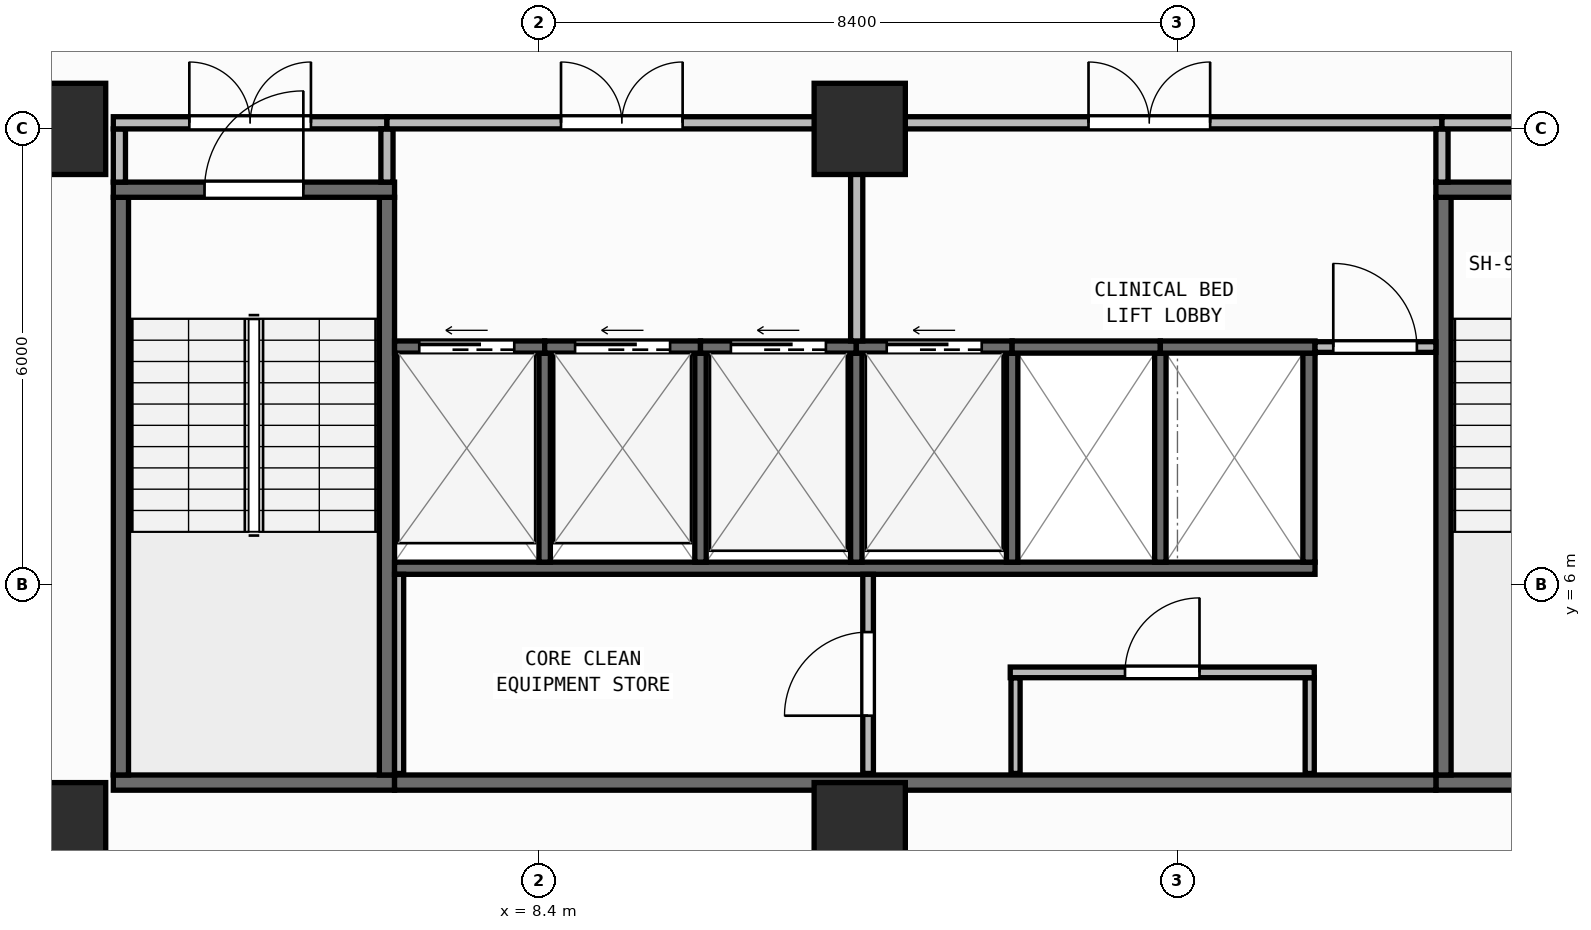
"""IFC4 building model, lengths in metres.
Left out: names, types, materials, properties, quantities, classifications, styles, units other than length and angle.
Written with IfcOpenShell. Run it as: python <this file> out.ifc"""

import sys

from ifc_helpers import new_model, si_unit, direction, frame, frame_2d, origin, origin_2d, place, context, subcontext, project, spatial, rectangle, extrude, element, fill, save


model = new_model("IFC4")
c1 = context("Model", 3, precision=1e-05, world=origin(), true_north=direction((0.0, 1.0)))
c2 = subcontext(c1, "Body", "Model", "MODEL_VIEW")
j1 = project(units=[si_unit("LENGTHUNIT", "METRE"), si_unit("PLANEANGLEUNIT", "RADIAN")], contexts=[c1])
p1 = place(None, origin())
s1 = spatial("IfcSite", under=j1, at=p1, CompositionType="ELEMENT")
p2 = place(p1, origin())
s2 = spatial("IfcBuilding", under=s1, at=p2, CompositionType="ELEMENT")
p3 = place(p2, frame((0.0, 0.0, 107.3)))
s3 = spatial("IfcBuildingStorey", under=s2, at=p3, CompositionType="ELEMENT", Elevation=107.3)
for number, where, z_axis, x_axis in (
    (1, (2.1, 2.8, 0.0), (0.0, 0.0, 1.0), (1.0, 0.0, 0.0)),
    (2, (12.62, 2.8, 0.0), (0.0, 0.0, 1.0), (1.0, 0.0, 0.0)),
    (3, (2.1, 12.0, 0.0), (0.0, 0.0, 1.0), (1.0, 0.0, 0.0)),
    (4, (12.62, 12.0, 0.0), (0.0, 0.0, 1.0), (1.0, 0.0, 0.0)),
):
    element("IfcColumn", number, at=place(p3, frame(where, z_axis=z_axis, x_axis=x_axis)), inside=s3, PredefinedType="COLUMN", context=c2, shape_type="SweptSolid", body=[
        extrude(rectangle(XDim=1.2, YDim=1.2, at=origin_2d()), origin(), (0.0, 0.0, 1.0), 3.95),
    ])
p4 = place(p3, frame((2.76, 0.173, 0.0), z_axis=(0.0, 0.0, 1.0), x_axis=(0.996857931723, 0.079210251617, 0.0)))
e5 = element("IfcWall", 5, at=p4, inside=s3, PredefinedType="STANDARD", context=c2, shape_type="SweptSolid", body=[
    extrude(rectangle(XDim=51.442, YDim=0.26, at=frame_2d((25.721, 0.0))), origin(), (0.0, 0.0, 1.0), 3.71),
])
p5 = place(p4, frame((24.521, 0.0, 0.9)))
e6 = element("IfcOpeningElement", 6, at=p5, cuts=e5, PredefinedType="OPENING", context=c2, shape_type="SweptSolid", body=[
    extrude(rectangle(XDim=2.4, YDim=1.65, at=frame_2d((1.2, 0.825))), frame((0.0, 0.14, 0.0), z_axis=(0.0, -1.0, 0.0), x_axis=(1.0, 0.0, 0.0)), (0.0, 0.0, 1.0), 0.28),
])
p6 = place(p3, frame((2.8, 3.4, 0.0), z_axis=(0.0, 0.0, 1.0), x_axis=(1.0, 0.0, 0.0)))
e7 = element("IfcWall", 7, at=p6, inside=s3, PredefinedType="SHEAR", context=c2, shape_type="SweptSolid", body=[
    extrude(rectangle(XDim=3.7, YDim=0.2, at=frame_2d((1.85, 0.0))), origin(), (0.0, 0.0, 1.0), 3.71),
])
for number, where, z_axis, x_axis in (
    (8, (2.9, 3.5, 0.0), (0.0, 0.0, 1.0), (0.0, 1.0, 0.0)),
    (9, (6.4, 3.5, 0.0), (0.0, 0.0, 1.0), (0.0, 1.0, 0.0)),
):
    element("IfcWall", number, at=place(p3, frame(where, z_axis=z_axis, x_axis=x_axis)), inside=s3, PredefinedType="SHEAR", context=c2, shape_type="SweptSolid", body=[
        extrude(rectangle(XDim=7.6, YDim=0.2, at=frame_2d((3.8, 0.0))), origin(), (0.0, 0.0, 1.0), 3.71),
    ])
p7 = place(p3, frame((2.8, 11.2, 0.0), z_axis=(0.0, 0.0, 1.0), x_axis=(1.0, 0.0, 0.0)))
e10 = element("IfcWall", 10, at=p7, inside=s3, PredefinedType="SHEAR", context=c2, shape_type="SweptSolid", body=[
    extrude(rectangle(XDim=3.7, YDim=0.2, at=frame_2d((1.85, 0.0))), origin(), (0.0, 0.0, 1.0), 3.71),
])
p8 = place(p7, frame((1.2, 0.0, 0.0)))
e11 = element("IfcOpeningElement", 11, at=p8, cuts=e10, PredefinedType="OPENING", context=c2, shape_type="SweptSolid", body=[
    extrude(rectangle(XDim=1.3, YDim=2.15, at=frame_2d((0.65, 1.075))), frame((0.0, 0.11, 0.0), z_axis=(0.0, -1.0, 0.0), x_axis=(1.0, 0.0, 0.0)), (0.0, 0.0, 1.0), 0.22),
])
p9 = place(p3, frame((20.2, 3.4, 0.0), z_axis=(0.0, 0.0, 1.0), x_axis=(1.0, 0.0, 0.0)))
e12 = element("IfcWall", 12, at=p9, inside=s3, PredefinedType="SHEAR", context=c2, shape_type="SweptSolid", body=[
    extrude(rectangle(XDim=3.7, YDim=0.2, at=frame_2d((1.85, 0.0))), origin(), (0.0, 0.0, 1.0), 3.71),
])
p10 = place(p3, frame((20.3, 3.5, 0.0), z_axis=(0.0, 0.0, 1.0), x_axis=(0.0, 1.0, 0.0)))
e13 = element("IfcWall", 13, at=p10, inside=s3, PredefinedType="SHEAR", context=c2, shape_type="SweptSolid", body=[
    extrude(rectangle(XDim=7.6, YDim=0.2, at=frame_2d((3.8, 0.0))), origin(), (0.0, 0.0, 1.0), 3.71),
])
p11 = place(p3, frame((20.2, 11.2, 0.0), z_axis=(0.0, 0.0, 1.0), x_axis=(1.0, 0.0, 0.0)))
e14 = element("IfcWall", 14, at=p11, inside=s3, PredefinedType="SHEAR", context=c2, shape_type="SweptSolid", body=[
    extrude(rectangle(XDim=3.7, YDim=0.2, at=frame_2d((1.85, 0.0))), origin(), (0.0, 0.0, 1.0), 3.71),
])
p12 = place(p11, frame((1.2, 0.0, 0.0)))
e15 = element("IfcOpeningElement", 15, at=p12, cuts=e14, PredefinedType="OPENING", context=c2, shape_type="SweptSolid", body=[
    extrude(rectangle(XDim=1.3, YDim=2.15, at=frame_2d((0.65, 1.075))), frame((0.0, 0.11, 0.0), z_axis=(0.0, -1.0, 0.0), x_axis=(1.0, 0.0, 0.0)), (0.0, 0.0, 1.0), 0.22),
])
p13 = place(p3, frame((6.5, 3.4, 0.0), z_axis=(0.0, 0.0, 1.0), x_axis=(1.0, 0.0, 0.0)))
e16 = element("IfcWall", 16, at=p13, inside=s3, PredefinedType="SHEAR", context=c2, shape_type="SweptSolid", body=[
    extrude(rectangle(XDim=13.7, YDim=0.2, at=frame_2d((6.85, 0.0))), origin(), (0.0, 0.0, 1.0), 3.71),
])
p14 = place(p3, frame((6.5, 6.22, 0.0), z_axis=(0.0, 0.0, 1.0), x_axis=(1.0, 0.0, 0.0)))
e17 = element("IfcWall", 17, at=p14, inside=s3, PredefinedType="SHEAR", context=c2, shape_type="SweptSolid", body=[
    extrude(rectangle(XDim=12.11, YDim=0.16, at=frame_2d((6.055, 0.0))), origin(), (0.0, 0.0, 1.0), 3.71),
])
p15 = place(p3, frame((18.53, 6.3, 0.0), z_axis=(0.0, 0.0, 1.0), x_axis=(0.0, 1.0, 0.0)))
e18 = element("IfcWall", 18, at=p15, inside=s3, PredefinedType="SHEAR", context=c2, shape_type="SweptSolid", body=[
    extrude(rectangle(XDim=2.75, YDim=0.16, at=frame_2d((1.375, 0.0))), origin(), (0.0, 0.0, 1.0), 3.71),
])
for number, where, z_axis, x_axis in (
    (19, (8.475, 6.3, 0.0), (0.0, 0.0, 1.0), (0.0, 1.0, 0.0)),
    (20, (10.525, 6.3, 0.0), (0.0, 0.0, 1.0), (0.0, 1.0, 0.0)),
    (21, (12.575, 6.3, 0.0), (0.0, 0.0, 1.0), (0.0, 1.0, 0.0)),
    (22, (14.625, 6.3, 0.0), (0.0, 0.0, 1.0), (0.0, 1.0, 0.0)),
    (23, (16.575, 6.3, 0.0), (0.0, 0.0, 1.0), (0.0, 1.0, 0.0)),
):
    element("IfcWall", number, at=place(p3, frame(where, z_axis=z_axis, x_axis=x_axis)), inside=s3, PredefinedType="SHEAR", context=c2, shape_type="SweptSolid", body=[
        extrude(rectangle(XDim=2.75, YDim=0.15, at=frame_2d((1.375, 0.0))), origin(), (0.0, 0.0, 1.0), 3.71),
    ])
p16 = place(p3, frame((6.5, 9.13, 0.0), z_axis=(0.0, 0.0, 1.0), x_axis=(1.0, 0.0, 0.0)))
e24 = element("IfcWall", 24, at=p16, inside=s3, PredefinedType="SHEAR", context=c2, shape_type="SweptSolid", body=[
    extrude(rectangle(XDim=1.975, YDim=0.16, at=frame_2d((0.988, 0.0))), origin(), (0.0, 0.0, 1.0), 3.71),
])
p17 = place(p16, frame((0.325, 0.0, 0.0)))
e25 = element("IfcOpeningElement", 25, at=p17, cuts=e24, PredefinedType="OPENING", context=c2, shape_type="SweptSolid", body=[
    extrude(rectangle(XDim=1.25, YDim=2.15, at=frame_2d((0.625, 1.075))), frame((0.0, 0.09, 0.0), z_axis=(0.0, -1.0, 0.0), x_axis=(1.0, 0.0, 0.0)), (0.0, 0.0, 1.0), 0.18),
])
p18 = place(p3, frame((8.475, 9.13, 0.0), z_axis=(0.0, 0.0, 1.0), x_axis=(1.0, 0.0, 0.0)))
e26 = element("IfcWall", 26, at=p18, inside=s3, PredefinedType="SHEAR", context=c2, shape_type="SweptSolid", body=[
    extrude(rectangle(XDim=2.05, YDim=0.16, at=frame_2d((1.025, 0.0))), origin(), (0.0, 0.0, 1.0), 3.71),
])
p19 = place(p18, frame((0.4, 0.0, 0.0)))
e27 = element("IfcOpeningElement", 27, at=p19, cuts=e26, PredefinedType="OPENING", context=c2, shape_type="SweptSolid", body=[
    extrude(rectangle(XDim=1.25, YDim=2.15, at=frame_2d((0.625, 1.075))), frame((0.0, 0.09, 0.0), z_axis=(0.0, -1.0, 0.0), x_axis=(1.0, 0.0, 0.0)), (0.0, 0.0, 1.0), 0.18),
])
p20 = place(p3, frame((10.525, 9.13, 0.0), z_axis=(0.0, 0.0, 1.0), x_axis=(1.0, 0.0, 0.0)))
e28 = element("IfcWall", 28, at=p20, inside=s3, PredefinedType="SHEAR", context=c2, shape_type="SweptSolid", body=[
    extrude(rectangle(XDim=2.05, YDim=0.16, at=frame_2d((1.025, 0.0))), origin(), (0.0, 0.0, 1.0), 3.71),
])
p21 = place(p20, frame((0.4, 0.0, 0.0)))
e29 = element("IfcOpeningElement", 29, at=p21, cuts=e28, PredefinedType="OPENING", context=c2, shape_type="SweptSolid", body=[
    extrude(rectangle(XDim=1.25, YDim=2.15, at=frame_2d((0.625, 1.075))), frame((0.0, 0.09, 0.0), z_axis=(0.0, -1.0, 0.0), x_axis=(1.0, 0.0, 0.0)), (0.0, 0.0, 1.0), 0.18),
])
p22 = place(p3, frame((12.575, 9.13, 0.0), z_axis=(0.0, 0.0, 1.0), x_axis=(1.0, 0.0, 0.0)))
e30 = element("IfcWall", 30, at=p22, inside=s3, PredefinedType="SHEAR", context=c2, shape_type="SweptSolid", body=[
    extrude(rectangle(XDim=2.05, YDim=0.16, at=frame_2d((1.025, 0.0))), origin(), (0.0, 0.0, 1.0), 3.71),
])
p23 = place(p22, frame((0.4, 0.0, 0.0)))
e31 = element("IfcOpeningElement", 31, at=p23, cuts=e30, PredefinedType="OPENING", context=c2, shape_type="SweptSolid", body=[
    extrude(rectangle(XDim=1.25, YDim=2.15, at=frame_2d((0.625, 1.075))), frame((0.0, 0.09, 0.0), z_axis=(0.0, -1.0, 0.0), x_axis=(1.0, 0.0, 0.0)), (0.0, 0.0, 1.0), 0.18),
])
p24 = place(p3, frame((14.625, 9.13, 0.0), z_axis=(0.0, 0.0, 1.0), x_axis=(1.0, 0.0, 0.0)))
e32 = element("IfcWall", 32, at=p24, inside=s3, PredefinedType="SHEAR", context=c2, shape_type="SweptSolid", body=[
    extrude(rectangle(XDim=1.95, YDim=0.16, at=frame_2d((0.975, 0.0))), origin(), (0.0, 0.0, 1.0), 3.71),
])
p25 = place(p3, frame((16.575, 9.13, 0.0), z_axis=(0.0, 0.0, 1.0), x_axis=(1.0, 0.0, 0.0)))
e33 = element("IfcWall", 33, at=p25, inside=s3, PredefinedType="SHEAR", context=c2, shape_type="SweptSolid", body=[
    extrude(rectangle(XDim=2.035, YDim=0.16, at=frame_2d((1.018, 0.0))), origin(), (0.0, 0.0, 1.0), 3.71),
])
p26 = place(p3, frame((6.56, 3.52, 0.0), z_axis=(0.0, 0.0, 1.0), x_axis=(0.0, 1.0, 0.0)))
e34 = element("IfcWall", 34, at=p26, inside=s3, PredefinedType="PARTITIONING", context=c2, shape_type="SweptSolid", body=[
    extrude(rectangle(XDim=2.62, YDim=0.12, at=frame_2d((1.31, 0.0))), origin(), (0.0, 0.0, 1.0), 3.71),
])
p27 = place(p3, frame((12.73, 3.52, 0.0), z_axis=(0.0, 0.0, 1.0), x_axis=(0.0, 1.0, 0.0)))
e35 = element("IfcWall", 35, at=p27, inside=s3, PredefinedType="PARTITIONING", context=c2, shape_type="SweptSolid", body=[
    extrude(rectangle(XDim=2.62, YDim=0.14, at=frame_2d((1.31, 0.0))), origin(), (0.0, 0.0, 1.0), 3.71),
])
p28 = place(p27, frame((0.76, 0.0, 0.0)))
e36 = element("IfcOpeningElement", 36, at=p28, cuts=e35, PredefinedType="OPENING", context=c2, shape_type="SweptSolid", body=[
    extrude(rectangle(XDim=1.1, YDim=2.1, at=frame_2d((0.55, 1.05))), frame((0.0, 0.08, 0.0), z_axis=(0.0, -1.0, 0.0), x_axis=(1.0, 0.0, 0.0)), (0.0, 0.0, 1.0), 0.16),
])
for number, where, z_axis, x_axis in (
    (37, (14.67, 3.52, 0.0), (0.0, 0.0, 1.0), (0.0, 1.0, 0.0)),
    (38, (18.54, 3.52, 0.0), (0.0, 0.0, 1.0), (0.0, 1.0, 0.0)),
):
    element("IfcWall", number, at=place(p3, frame(where, z_axis=z_axis, x_axis=x_axis)), inside=s3, PredefinedType="PARTITIONING", context=c2, shape_type="SweptSolid", body=[
        extrude(rectangle(XDim=1.26, YDim=0.12, at=frame_2d((0.63, 0.0))), origin(), (0.0, 0.0, 1.0), 3.71),
    ])
p29 = place(p3, frame((14.6, 4.85, 0.0), z_axis=(0.0, 0.0, 1.0), x_axis=(1.0, 0.0, 0.0)))
e39 = element("IfcWall", 39, at=p29, inside=s3, PredefinedType="PARTITIONING", context=c2, shape_type="SweptSolid", body=[
    extrude(rectangle(XDim=4.0, YDim=0.14, at=frame_2d((2.0, 0.0))), origin(), (0.0, 0.0, 1.0), 3.71),
])
p30 = place(p29, frame((1.51, 0.0, 0.0)))
e40 = element("IfcOpeningElement", 40, at=p30, cuts=e39, PredefinedType="OPENING", context=c2, shape_type="SweptSolid", body=[
    extrude(rectangle(XDim=0.98, YDim=2.1, at=frame_2d((0.49, 1.05))), frame((0.0, 0.08, 0.0), z_axis=(0.0, -1.0, 0.0), x_axis=(1.0, 0.0, 0.0)), (0.0, 0.0, 1.0), 0.16),
])
p31 = place(p3, frame((18.61, 9.13, 0.0), z_axis=(0.0, 0.0, 1.0), x_axis=(1.0, 0.0, 0.0)))
e41 = element("IfcWall", 41, at=p31, inside=s3, PredefinedType="PARTITIONING", context=c2, shape_type="SweptSolid", body=[
    extrude(rectangle(XDim=1.59, YDim=0.14, at=frame_2d((0.795, 0.0))), origin(), (0.0, 0.0, 1.0), 3.71),
])
p32 = place(p31, frame((0.24, 0.0, 0.0)))
e42 = element("IfcOpeningElement", 42, at=p32, cuts=e41, PredefinedType="OPENING", context=c2, shape_type="SweptSolid", body=[
    extrude(rectangle(XDim=1.1, YDim=2.1, at=frame_2d((0.55, 1.05))), frame((0.0, 0.08, 0.0), z_axis=(0.0, -1.0, 0.0), x_axis=(1.0, 0.0, 0.0)), (0.0, 0.0, 1.0), 0.16),
])
p33 = place(p3, frame((2.88, 11.3, 0.0), z_axis=(0.0, 0.0, 1.0), x_axis=(0.0, 1.0, 0.0)))
e43 = element("IfcWall", 43, at=p33, inside=s3, PredefinedType="PARTITIONING", context=c2, shape_type="SweptSolid", body=[
    extrude(rectangle(XDim=0.7, YDim=0.16, at=frame_2d((0.35, 0.0))), origin(), (0.0, 0.0, 1.0), 3.71),
])
p34 = place(p3, frame((2.8, 12.08, 0.0), z_axis=(0.0, 0.0, 1.0), x_axis=(1.0, 0.0, 0.0)))
e44 = element("IfcWall", 44, at=p34, inside=s3, PredefinedType="PARTITIONING", context=c2, shape_type="SweptSolid", body=[
    extrude(rectangle(XDim=3.6, YDim=0.16, at=frame_2d((1.8, 0.0))), origin(), (0.0, 0.0, 1.0), 3.083),
])
p35 = place(p34, frame((1.0, 0.0, 0.0)))
e45 = element("IfcOpeningElement", 45, at=p35, cuts=e44, PredefinedType="OPENING", context=c2, shape_type="SweptSolid", body=[
    extrude(rectangle(XDim=1.6, YDim=2.05, at=frame_2d((0.8, 1.025))), frame((0.0, 0.09, 0.0), z_axis=(0.0, -1.0, 0.0), x_axis=(1.0, 0.0, 0.0)), (0.0, 0.0, 1.0), 0.18),
])
p36 = place(p3, frame((6.4, 11.3, 0.0), z_axis=(0.0, 0.0, 1.0), x_axis=(0.0, 1.0, 0.0)))
e46 = element("IfcWall", 46, at=p36, inside=s3, PredefinedType="PARTITIONING", context=c2, shape_type="SweptSolid", body=[
    extrude(rectangle(XDim=0.7, YDim=0.16, at=frame_2d((0.35, 0.0))), origin(), (0.0, 0.0, 1.0), 3.71),
])
p37 = place(p3, frame((6.4, 12.08, 0.0), z_axis=(0.0, 0.0, 1.0), x_axis=(1.0, 0.0, 0.0)))
e47 = element("IfcWall", 47, at=p37, inside=s3, PredefinedType="PARTITIONING", context=c2, shape_type="SweptSolid", body=[
    extrude(rectangle(XDim=6.18, YDim=0.16, at=frame_2d((3.09, 0.0))), origin(), (0.0, 0.0, 1.0), 3.083),
])
p38 = place(p37, frame((2.29, 0.0, 0.0)))
e48 = element("IfcOpeningElement", 48, at=p38, cuts=e47, PredefinedType="OPENING", context=c2, shape_type="SweptSolid", body=[
    extrude(rectangle(XDim=1.6, YDim=2.05, at=frame_2d((0.8, 1.025))), frame((0.0, 0.09, 0.0), z_axis=(0.0, -1.0, 0.0), x_axis=(1.0, 0.0, 0.0)), (0.0, 0.0, 1.0), 0.18),
])
p39 = place(p3, frame((12.58, 9.21, 0.0), z_axis=(0.0, 0.0, 1.0), x_axis=(0.0, 1.0, 0.0)))
e49 = element("IfcWall", 49, at=p39, inside=s3, PredefinedType="PARTITIONING", context=c2, shape_type="SweptSolid", body=[
    extrude(rectangle(XDim=2.79, YDim=0.16, at=frame_2d((1.395, 0.0))), origin(), (0.0, 0.0, 1.0), 3.71),
])
p40 = place(p3, frame((12.58, 12.08, 0.0), z_axis=(0.0, 0.0, 1.0), x_axis=(1.0, 0.0, 0.0)))
e50 = element("IfcWall", 50, at=p40, inside=s3, PredefinedType="PARTITIONING", context=c2, shape_type="SweptSolid", body=[
    extrude(rectangle(XDim=7.7, YDim=0.16, at=frame_2d((3.85, 0.0))), origin(), (0.0, 0.0, 1.0), 3.083),
])
p41 = place(p40, frame((3.05, 0.0, 0.0)))
e51 = element("IfcOpeningElement", 51, at=p41, cuts=e50, PredefinedType="OPENING", context=c2, shape_type="SweptSolid", body=[
    extrude(rectangle(XDim=1.6, YDim=2.05, at=frame_2d((0.8, 1.025))), frame((0.0, 0.09, 0.0), z_axis=(0.0, -1.0, 0.0), x_axis=(1.0, 0.0, 0.0)), (0.0, 0.0, 1.0), 0.18),
])
p42 = place(p3, frame((20.28, 11.3, 0.0), z_axis=(0.0, 0.0, 1.0), x_axis=(0.0, 1.0, 0.0)))
e52 = element("IfcWall", 52, at=p42, inside=s3, PredefinedType="PARTITIONING", context=c2, shape_type="SweptSolid", body=[
    extrude(rectangle(XDim=0.7, YDim=0.16, at=frame_2d((0.35, 0.0))), origin(), (0.0, 0.0, 1.0), 3.71),
])
p43 = place(p3, frame((20.28, 12.08, 0.0), z_axis=(0.0, 0.0, 1.0), x_axis=(1.0, 0.0, 0.0)))
e53 = element("IfcWall", 53, at=p43, inside=s3, PredefinedType="PARTITIONING", context=c2, shape_type="SweptSolid", body=[
    extrude(rectangle(XDim=3.62, YDim=0.16, at=frame_2d((1.81, 0.0))), origin(), (0.0, 0.0, 1.0), 3.083),
])
p44 = place(p43, frame((1.01, 0.0, 0.0)))
e54 = element("IfcOpeningElement", 54, at=p44, cuts=e53, PredefinedType="OPENING", context=c2, shape_type="SweptSolid", body=[
    extrude(rectangle(XDim=1.6, YDim=2.05, at=frame_2d((0.8, 1.025))), frame((0.0, 0.09, 0.0), z_axis=(0.0, -1.0, 0.0), x_axis=(1.0, 0.0, 0.0)), (0.0, 0.0, 1.0), 0.18),
])
p45 = place(p8, origin())
e55 = element("IfcDoor", 55, at=p45, inside=s3, OperationType="SINGLE_SWING_RIGHT", PredefinedType="DOOR", context=c2, shape_type="SweptSolid", body=[
    extrude(rectangle(XDim=1.3, YDim=2.15, at=frame_2d((0.65, 1.075))), frame((0.0, 0.025, 0.0), z_axis=(0.0, -1.0, 0.0), x_axis=(1.0, 0.0, 0.0)), (0.0, 0.0, 1.0), 0.05),
])
fill(e11, e55)
p46 = place(p17, origin())
e56 = element("IfcDoor", 56, at=p46, inside=s3, OperationType="SLIDING_TO_LEFT", PredefinedType="DOOR", context=c2, shape_type="SweptSolid", body=[
    extrude(rectangle(XDim=1.25, YDim=2.15, at=frame_2d((0.625, 1.075))), frame((0.0, 0.025, 0.0), z_axis=(0.0, -1.0, 0.0), x_axis=(1.0, 0.0, 0.0)), (0.0, 0.0, 1.0), 0.05),
])
fill(e25, e56)
p47 = place(p19, origin())
e57 = element("IfcDoor", 57, at=p47, inside=s3, OperationType="SLIDING_TO_LEFT", PredefinedType="DOOR", context=c2, shape_type="SweptSolid", body=[
    extrude(rectangle(XDim=1.25, YDim=2.15, at=frame_2d((0.625, 1.075))), frame((0.0, 0.025, 0.0), z_axis=(0.0, -1.0, 0.0), x_axis=(1.0, 0.0, 0.0)), (0.0, 0.0, 1.0), 0.05),
])
fill(e27, e57)
p48 = place(p21, origin())
e58 = element("IfcDoor", 58, at=p48, inside=s3, OperationType="SLIDING_TO_LEFT", PredefinedType="DOOR", context=c2, shape_type="SweptSolid", body=[
    extrude(rectangle(XDim=1.25, YDim=2.15, at=frame_2d((0.625, 1.075))), frame((0.0, 0.025, 0.0), z_axis=(0.0, -1.0, 0.0), x_axis=(1.0, 0.0, 0.0)), (0.0, 0.0, 1.0), 0.05),
])
fill(e29, e58)
p49 = place(p23, origin())
e59 = element("IfcDoor", 59, at=p49, inside=s3, OperationType="SLIDING_TO_LEFT", PredefinedType="DOOR", context=c2, shape_type="SweptSolid", body=[
    extrude(rectangle(XDim=1.25, YDim=2.15, at=frame_2d((0.625, 1.075))), frame((0.0, 0.025, 0.0), z_axis=(0.0, -1.0, 0.0), x_axis=(1.0, 0.0, 0.0)), (0.0, 0.0, 1.0), 0.05),
])
fill(e31, e59)
p50 = place(p28, origin())
e60 = element("IfcDoor", 60, at=p50, inside=s3, OperationType="SINGLE_SWING_LEFT", PredefinedType="DOOR", context=c2, shape_type="SweptSolid", body=[
    extrude(rectangle(XDim=1.1, YDim=2.1, at=frame_2d((0.55, 1.05))), frame((0.0, 0.025, 0.0), z_axis=(0.0, -1.0, 0.0), x_axis=(1.0, 0.0, 0.0)), (0.0, 0.0, 1.0), 0.05),
])
fill(e36, e60)
p51 = place(p30, origin())
e61 = element("IfcDoor", 61, at=p51, inside=s3, OperationType="SINGLE_SWING_RIGHT", PredefinedType="DOOR", context=c2, shape_type="SweptSolid", body=[
    extrude(rectangle(XDim=0.98, YDim=2.1, at=frame_2d((0.49, 1.05))), frame((0.0, 0.025, 0.0), z_axis=(0.0, -1.0, 0.0), x_axis=(1.0, 0.0, 0.0)), (0.0, 0.0, 1.0), 0.05),
])
fill(e40, e61)
p52 = place(p32, origin())
e62 = element("IfcDoor", 62, at=p52, inside=s3, OperationType="SINGLE_SWING_LEFT", PredefinedType="DOOR", context=c2, shape_type="SweptSolid", body=[
    extrude(rectangle(XDim=1.1, YDim=2.1, at=frame_2d((0.55, 1.05))), frame((0.0, 0.025, 0.0), z_axis=(0.0, -1.0, 0.0), x_axis=(1.0, 0.0, 0.0)), (0.0, 0.0, 1.0), 0.05),
])
fill(e42, e62)
p53 = place(p35, origin())
e63 = element("IfcDoor", 63, at=p53, inside=s3, OperationType="DOUBLE_DOOR_SINGLE_SWING", PredefinedType="DOOR", context=c2, shape_type="SweptSolid", body=[
    extrude(rectangle(XDim=1.6, YDim=2.05, at=frame_2d((0.8, 1.025))), frame((0.0, 0.025, 0.0), z_axis=(0.0, -1.0, 0.0), x_axis=(1.0, 0.0, 0.0)), (0.0, 0.0, 1.0), 0.05),
])
fill(e45, e63)
p54 = place(p38, origin())
e64 = element("IfcDoor", 64, at=p54, inside=s3, OperationType="DOUBLE_DOOR_SINGLE_SWING", PredefinedType="DOOR", context=c2, shape_type="SweptSolid", body=[
    extrude(rectangle(XDim=1.6, YDim=2.05, at=frame_2d((0.8, 1.025))), frame((0.0, 0.025, 0.0), z_axis=(0.0, -1.0, 0.0), x_axis=(1.0, 0.0, 0.0)), (0.0, 0.0, 1.0), 0.05),
])
fill(e48, e64)
p55 = place(p41, origin())
e65 = element("IfcDoor", 65, at=p55, inside=s3, OperationType="DOUBLE_DOOR_SINGLE_SWING", PredefinedType="DOOR", context=c2, shape_type="SweptSolid", body=[
    extrude(rectangle(XDim=1.6, YDim=2.05, at=frame_2d((0.8, 1.025))), frame((0.0, 0.025, 0.0), z_axis=(0.0, -1.0, 0.0), x_axis=(1.0, 0.0, 0.0)), (0.0, 0.0, 1.0), 0.05),
])
fill(e51, e65)
save(model, sys.argv[1])
